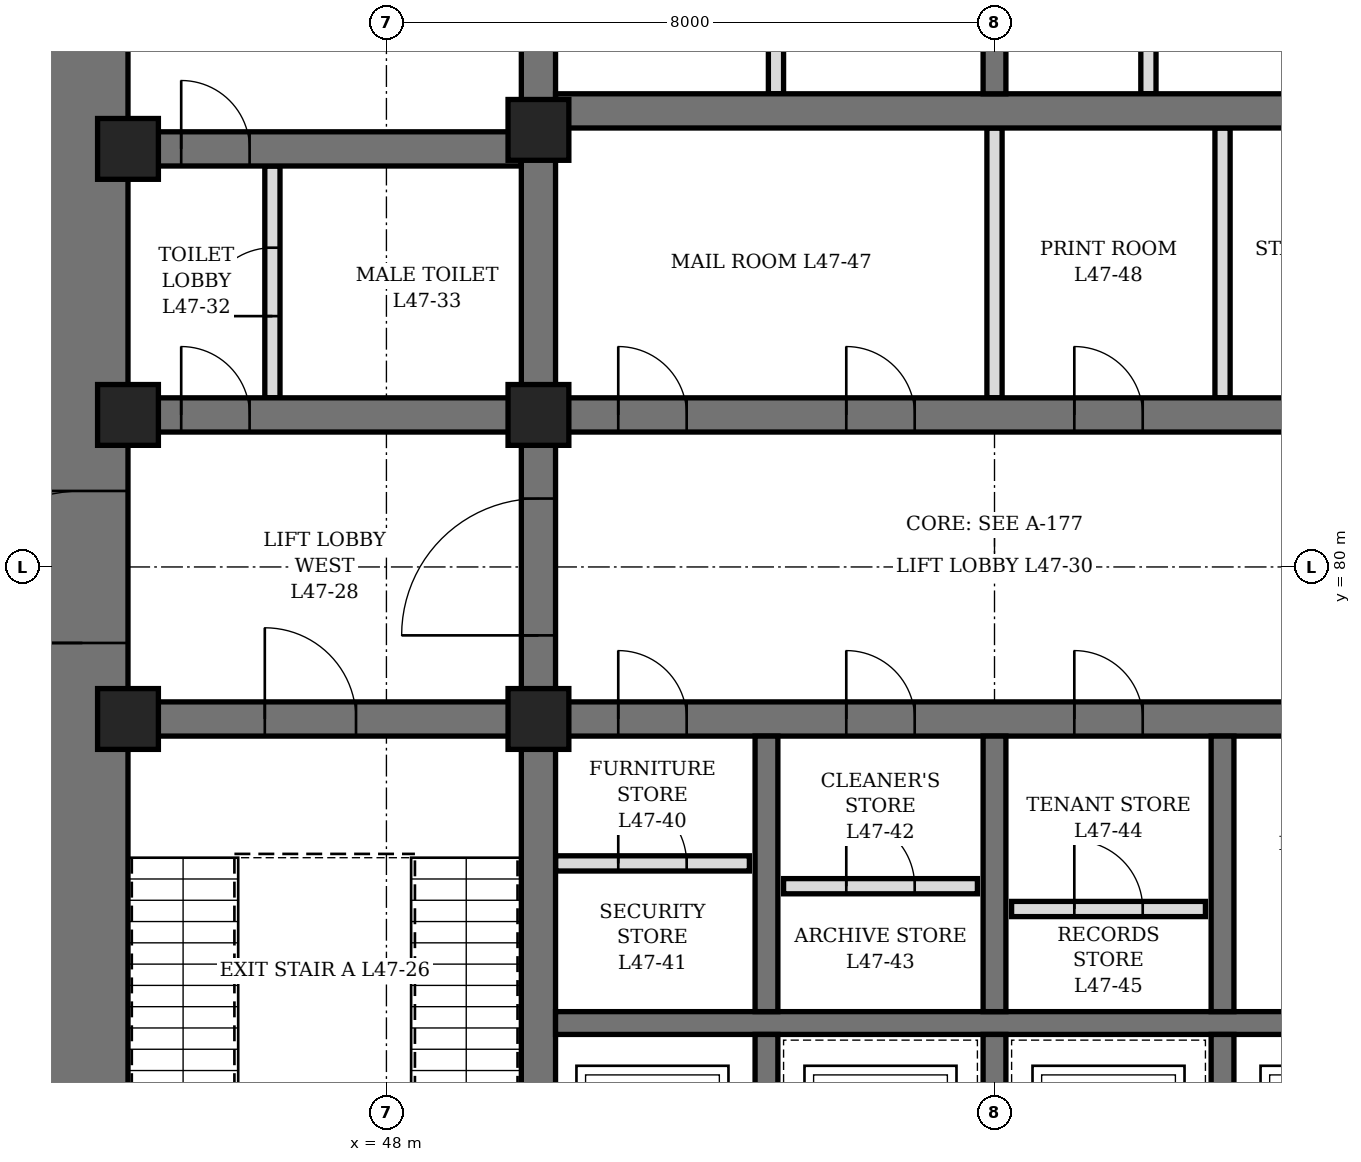
"""IFC4 building model, lengths in metres.
Left out: names, types, materials, properties, quantities, classifications, styles, units other than length and angle.
Written with IfcOpenShell. Run it as: python <this file> out.ifc"""

import sys

from ifc_helpers import new_model, si_unit, direction, frame, frame_2d, origin, origin_2d, place, context, subcontext, project, spatial, rectangle, hollow_rectangle, extrude, element, fill, save


model = new_model("IFC4")
c1 = context("Model", 3, precision=1e-05, world=origin(), true_north=direction((0.0, 1.0)))
c2 = subcontext(c1, "Body", "Model", "MODEL_VIEW")
j1 = project(units=[si_unit("LENGTHUNIT", "METRE"), si_unit("PLANEANGLEUNIT", "RADIAN")], contexts=[c1])
p1 = place(None, origin())
s1 = spatial("IfcSite", under=j1, at=p1, CompositionType="ELEMENT")
p2 = place(p1, origin())
s2 = spatial("IfcBuilding", under=s1, at=p2, CompositionType="ELEMENT")
p3 = place(p2, frame((0.0, 0.0, 210.7)))
s3 = spatial("IfcBuildingStorey", under=s2, at=p3, CompositionType="ELEMENT", Elevation=210.7)
p4 = place(p3, frame((44.0, 70.4, 0.0), z_axis=(0.0, 0.0, 1.0), x_axis=(0.0, 1.0, 0.0)))
e1 = element("IfcWall", 1, at=p4, inside=s3, PredefinedType="SHEAR", context=c2, shape_type="SweptSolid", body=[
    extrude(rectangle(XDim=19.2, YDim=1.2, at=frame_2d((9.6, 0.0))), origin(), (0.0, 0.0, 1.0), 4.2),
])
p5 = place(p4, frame((8.6, 0.0, 0.0)))
e2 = element("IfcOpeningElement", 2, at=p5, cuts=e1, PredefinedType="OPENING", context=c2, shape_type="SweptSolid", body=[
    extrude(rectangle(XDim=2.0, YDim=2.4, at=frame_2d((1.0, 1.2))), frame((0.0, 0.61, 0.0), z_axis=(0.0, -1.0, 0.0), x_axis=(1.0, 0.0, 0.0)), (0.0, 0.0, 1.0), 1.22),
])
p6 = place(p3, frame((50.0, 71.6, 0.0), z_axis=(0.0, 0.0, 1.0), x_axis=(0.0, 1.0, 0.0)))
e3 = element("IfcWall", 3, at=p6, inside=s3, PredefinedType="SHEAR", context=c2, shape_type="SweptSolid", body=[
    extrude(rectangle(XDim=16.8, YDim=0.45, at=frame_2d((8.4, 0.0))), origin(), (0.0, 0.0, 1.0), 4.2),
])
p7 = place(p6, frame((7.5, 0.0, 0.0)))
e4 = element("IfcOpeningElement", 4, at=p7, cuts=e3, PredefinedType="OPENING", context=c2, shape_type="SweptSolid", body=[
    extrude(rectangle(XDim=1.8, YDim=2.4, at=frame_2d((0.9, 1.2))), frame((0.0, 0.235, 0.0), z_axis=(0.0, -1.0, 0.0), x_axis=(1.0, 0.0, 0.0)), (0.0, 0.0, 1.0), 0.47),
])
p8 = place(p3, frame((44.6, 78.0, 0.0), z_axis=(0.0, 0.0, 1.0), x_axis=(1.0, 0.0, 0.0)))
e5 = element("IfcWall", 5, at=p8, inside=s3, PredefinedType="SHEAR", context=c2, shape_type="SweptSolid", body=[
    extrude(rectangle(XDim=5.175, YDim=0.45, at=frame_2d((2.587, 0.0))), origin(), (0.0, 0.0, 1.0), 4.2),
])
p9 = place(p8, frame((1.8, 0.0, 0.0)))
e6 = element("IfcOpeningElement", 6, at=p9, cuts=e5, PredefinedType="OPENING", context=c2, shape_type="SweptSolid", body=[
    extrude(rectangle(XDim=1.2, YDim=2.1, at=frame_2d((0.6, 1.05))), frame((0.0, 0.235, 0.0), z_axis=(0.0, -1.0, 0.0), x_axis=(1.0, 0.0, 0.0)), (0.0, 0.0, 1.0), 0.47),
])
p10 = place(p3, frame((44.6, 82.0, 0.0), z_axis=(0.0, 0.0, 1.0), x_axis=(1.0, 0.0, 0.0)))
e7 = element("IfcWall", 7, at=p10, inside=s3, PredefinedType="SHEAR", context=c2, shape_type="SweptSolid", body=[
    extrude(rectangle(XDim=5.175, YDim=0.45, at=frame_2d((2.587, 0.0))), origin(), (0.0, 0.0, 1.0), 4.2),
])
p11 = place(p10, frame((0.7, 0.0, 0.0)))
e8 = element("IfcOpeningElement", 8, at=p11, cuts=e7, PredefinedType="OPENING", context=c2, shape_type="SweptSolid", body=[
    extrude(rectangle(XDim=0.9, YDim=2.1, at=frame_2d((0.45, 1.05))), frame((0.0, 0.235, 0.0), z_axis=(0.0, -1.0, 0.0), x_axis=(1.0, 0.0, 0.0)), (0.0, 0.0, 1.0), 0.47),
])
p12 = place(p3, frame((44.6, 85.5, 0.0), z_axis=(0.0, 0.0, 1.0), x_axis=(1.0, 0.0, 0.0)))
e9 = element("IfcWall", 9, at=p12, inside=s3, PredefinedType="SHEAR", context=c2, shape_type="SweptSolid", body=[
    extrude(rectangle(XDim=5.175, YDim=0.45, at=frame_2d((2.587, 0.0))), origin(), (0.0, 0.0, 1.0), 4.2),
])
p13 = place(p12, frame((0.7, 0.0, 0.0)))
e10 = element("IfcOpeningElement", 10, at=p13, cuts=e9, PredefinedType="OPENING", context=c2, shape_type="SweptSolid", body=[
    extrude(rectangle(XDim=0.9, YDim=2.1, at=frame_2d((0.45, 1.05))), frame((0.0, 0.235, 0.0), z_axis=(0.0, -1.0, 0.0), x_axis=(1.0, 0.0, 0.0)), (0.0, 0.0, 1.0), 0.47),
])
p14 = place(p3, frame((50.225, 78.0, 0.0), z_axis=(0.0, 0.0, 1.0), x_axis=(1.0, 0.0, 0.0)))
e11 = element("IfcWall", 11, at=p14, inside=s3, PredefinedType="SHEAR", context=c2, shape_type="SweptSolid", body=[
    extrude(rectangle(XDim=11.55, YDim=0.45, at=frame_2d((5.775, 0.0))), origin(), (0.0, 0.0, 1.0), 4.2),
])
p15 = place(p14, frame((0.825, 0.0, 0.0)))
e12 = element("IfcOpeningElement", 12, at=p15, cuts=e11, PredefinedType="OPENING", context=c2, shape_type="SweptSolid", body=[
    extrude(rectangle(XDim=0.9, YDim=2.1, at=frame_2d((0.45, 1.05))), frame((0.0, 0.235, 0.0), z_axis=(0.0, -1.0, 0.0), x_axis=(1.0, 0.0, 0.0)), (0.0, 0.0, 1.0), 0.47),
])
p16 = place(p14, frame((3.825, 0.0, 0.0)))
e13 = element("IfcOpeningElement", 13, at=p16, cuts=e11, PredefinedType="OPENING", context=c2, shape_type="SweptSolid", body=[
    extrude(rectangle(XDim=0.9, YDim=2.1, at=frame_2d((0.45, 1.05))), frame((0.0, 0.235, 0.0), z_axis=(0.0, -1.0, 0.0), x_axis=(1.0, 0.0, 0.0)), (0.0, 0.0, 1.0), 0.47),
])
p17 = place(p14, frame((6.825, 0.0, 0.0)))
e14 = element("IfcOpeningElement", 14, at=p17, cuts=e11, PredefinedType="OPENING", context=c2, shape_type="SweptSolid", body=[
    extrude(rectangle(XDim=0.9, YDim=2.1, at=frame_2d((0.45, 1.05))), frame((0.0, 0.235, 0.0), z_axis=(0.0, -1.0, 0.0), x_axis=(1.0, 0.0, 0.0)), (0.0, 0.0, 1.0), 0.47),
])
p18 = place(p14, frame((9.825, 0.0, 0.0)))
e15 = element("IfcOpeningElement", 15, at=p18, cuts=e11, PredefinedType="OPENING", context=c2, shape_type="SweptSolid", body=[
    extrude(rectangle(XDim=0.9, YDim=2.1, at=frame_2d((0.45, 1.05))), frame((0.0, 0.235, 0.0), z_axis=(0.0, -1.0, 0.0), x_axis=(1.0, 0.0, 0.0)), (0.0, 0.0, 1.0), 0.47),
])
p19 = place(p3, frame((50.225, 82.0, 0.0), z_axis=(0.0, 0.0, 1.0), x_axis=(1.0, 0.0, 0.0)))
e16 = element("IfcWall", 16, at=p19, inside=s3, PredefinedType="SHEAR", context=c2, shape_type="SweptSolid", body=[
    extrude(rectangle(XDim=11.55, YDim=0.45, at=frame_2d((5.775, 0.0))), origin(), (0.0, 0.0, 1.0), 4.2),
])
p20 = place(p19, frame((0.825, 0.0, 0.0)))
e17 = element("IfcOpeningElement", 17, at=p20, cuts=e16, PredefinedType="OPENING", context=c2, shape_type="SweptSolid", body=[
    extrude(rectangle(XDim=0.9, YDim=2.1, at=frame_2d((0.45, 1.05))), frame((0.0, 0.235, 0.0), z_axis=(0.0, -1.0, 0.0), x_axis=(1.0, 0.0, 0.0)), (0.0, 0.0, 1.0), 0.47),
])
p21 = place(p19, frame((3.825, 0.0, 0.0)))
e18 = element("IfcOpeningElement", 18, at=p21, cuts=e16, PredefinedType="OPENING", context=c2, shape_type="SweptSolid", body=[
    extrude(rectangle(XDim=0.9, YDim=2.1, at=frame_2d((0.45, 1.05))), frame((0.0, 0.235, 0.0), z_axis=(0.0, -1.0, 0.0), x_axis=(1.0, 0.0, 0.0)), (0.0, 0.0, 1.0), 0.47),
])
p22 = place(p19, frame((6.825, 0.0, 0.0)))
e19 = element("IfcOpeningElement", 19, at=p22, cuts=e16, PredefinedType="OPENING", context=c2, shape_type="SweptSolid", body=[
    extrude(rectangle(XDim=0.9, YDim=2.1, at=frame_2d((0.45, 1.05))), frame((0.0, 0.235, 0.0), z_axis=(0.0, -1.0, 0.0), x_axis=(1.0, 0.0, 0.0)), (0.0, 0.0, 1.0), 0.47),
])
p23 = place(p19, frame((9.825, 0.0, 0.0)))
e20 = element("IfcOpeningElement", 20, at=p23, cuts=e16, PredefinedType="OPENING", context=c2, shape_type="SweptSolid", body=[
    extrude(rectangle(XDim=0.9, YDim=2.1, at=frame_2d((0.45, 1.05))), frame((0.0, 0.235, 0.0), z_axis=(0.0, -1.0, 0.0), x_axis=(1.0, 0.0, 0.0)), (0.0, 0.0, 1.0), 0.47),
])
p24 = place(p3, frame((50.225, 86.0, 0.0), z_axis=(0.0, 0.0, 1.0), x_axis=(1.0, 0.0, 0.0)))
e21 = element("IfcWall", 21, at=p24, inside=s3, PredefinedType="SHEAR", context=c2, shape_type="SweptSolid", body=[
    extrude(rectangle(XDim=11.55, YDim=0.45, at=frame_2d((5.775, 0.0))), origin(), (0.0, 0.0, 1.0), 4.2),
])
p25 = place(p3, frame((50.225, 74.0, 0.0), z_axis=(0.0, 0.0, 1.0), x_axis=(1.0, 0.0, 0.0)))
e22 = element("IfcWall", 22, at=p25, inside=s3, PredefinedType="SHEAR", context=c2, shape_type="SweptSolid", body=[
    extrude(rectangle(XDim=11.55, YDim=0.3, at=frame_2d((5.775, 0.0))), origin(), (0.0, 0.0, 1.0), 4.2),
])
p26 = place(p3, frame((53.0, 71.6, 0.0), z_axis=(0.0, 0.0, 1.0), x_axis=(0.0, 1.0, 0.0)))
e23 = element("IfcWall", 23, at=p26, inside=s3, PredefinedType="SHEAR", context=c2, shape_type="SweptSolid", body=[
    extrude(rectangle(XDim=2.25, YDim=0.3, at=frame_2d((1.125, 0.0))), origin(), (0.0, 0.0, 1.0), 4.2),
])
p27 = place(p3, frame((53.0, 74.15, 0.0), z_axis=(0.0, 0.0, 1.0), x_axis=(0.0, 1.0, 0.0)))
e24 = element("IfcWall", 24, at=p27, inside=s3, PredefinedType="SHEAR", context=c2, shape_type="SweptSolid", body=[
    extrude(rectangle(XDim=3.625, YDim=0.3, at=frame_2d((1.812, 0.0))), origin(), (0.0, 0.0, 1.0), 4.2),
])
p28 = place(p3, frame((56.0, 71.6, 0.0), z_axis=(0.0, 0.0, 1.0), x_axis=(0.0, 1.0, 0.0)))
e25 = element("IfcWall", 25, at=p28, inside=s3, PredefinedType="SHEAR", context=c2, shape_type="SweptSolid", body=[
    extrude(rectangle(XDim=2.25, YDim=0.3, at=frame_2d((1.125, 0.0))), origin(), (0.0, 0.0, 1.0), 4.2),
])
p29 = place(p3, frame((56.0, 74.15, 0.0), z_axis=(0.0, 0.0, 1.0), x_axis=(0.0, 1.0, 0.0)))
e26 = element("IfcWall", 26, at=p29, inside=s3, PredefinedType="SHEAR", context=c2, shape_type="SweptSolid", body=[
    extrude(rectangle(XDim=3.625, YDim=0.3, at=frame_2d((1.812, 0.0))), origin(), (0.0, 0.0, 1.0), 4.2),
])
p30 = place(p3, frame((59.0, 71.6, 0.0), z_axis=(0.0, 0.0, 1.0), x_axis=(0.0, 1.0, 0.0)))
e27 = element("IfcWall", 27, at=p30, inside=s3, PredefinedType="SHEAR", context=c2, shape_type="SweptSolid", body=[
    extrude(rectangle(XDim=2.25, YDim=0.3, at=frame_2d((1.125, 0.0))), origin(), (0.0, 0.0, 1.0), 4.2),
])
p31 = place(p3, frame((59.0, 74.15, 0.0), z_axis=(0.0, 0.0, 1.0), x_axis=(0.0, 1.0, 0.0)))
e28 = element("IfcWall", 28, at=p31, inside=s3, PredefinedType="SHEAR", context=c2, shape_type="SweptSolid", body=[
    extrude(rectangle(XDim=3.625, YDim=0.3, at=frame_2d((1.812, 0.0))), origin(), (0.0, 0.0, 1.0), 4.2),
])
p32 = place(p3, frame((56.0, 86.225, 0.0), z_axis=(0.0, 0.0, 1.0), x_axis=(0.0, 1.0, 0.0)))
e29 = element("IfcWall", 29, at=p32, inside=s3, PredefinedType="SHEAR", context=c2, shape_type="SweptSolid", body=[
    extrude(rectangle(XDim=2.175, YDim=0.3, at=frame_2d((1.087, 0.0))), origin(), (0.0, 0.0, 1.0), 4.2),
])
for number, where, z_axis, x_axis in (
    (30, (44.6, 78.0, 0.0), (0.0, 0.0, 1.0), (1.0, 0.0, 0.0)),
    (31, (44.6, 82.0, 0.0), (0.0, 0.0, 1.0), (1.0, 0.0, 0.0)),
    (32, (44.6, 85.5, 0.0), (0.0, 0.0, 1.0), (1.0, 0.0, 0.0)),
    (33, (50.0, 78.0, 0.0), (0.0, 0.0, 1.0), (1.0, 0.0, 0.0)),
    (34, (50.0, 82.0, 0.0), (0.0, 0.0, 1.0), (1.0, 0.0, 0.0)),
    (35, (50.0, 85.75, 0.0), (0.0, 0.0, 1.0), (1.0, 0.0, 0.0)),
):
    element("IfcColumn", number, at=place(p3, frame(where, z_axis=z_axis, x_axis=x_axis)), inside=s3, PredefinedType="COLUMN", context=c2, shape_type="SweptSolid", body=[
        extrude(hollow_rectangle(XDim=0.8, YDim=0.8, WallThickness=0.1, at=origin_2d()), origin(), (0.0, 0.0, 1.0), 4.2),
    ])
p33 = place(p3, frame((46.5, 82.225, 0.0), z_axis=(0.0, 0.0, 1.0), x_axis=(0.0, 1.0, 0.0)))
e36 = element("IfcWall", 36, at=p33, inside=s3, PredefinedType="PARTITIONING", context=c2, shape_type="SweptSolid", body=[
    extrude(rectangle(XDim=3.05, YDim=0.2, at=frame_2d((1.525, 0.0))), origin(), (0.0, 0.0, 1.0), 4.04),
])
p34 = place(p33, frame((1.075, 0.0, 0.0)))
e37 = element("IfcOpeningElement", 37, at=p34, cuts=e36, PredefinedType="OPENING", context=c2, shape_type="SweptSolid", body=[
    extrude(rectangle(XDim=0.9, YDim=2.1, at=frame_2d((0.45, 1.05))), frame((0.0, 0.11, 0.0), z_axis=(0.0, -1.0, 0.0), x_axis=(1.0, 0.0, 0.0)), (0.0, 0.0, 1.0), 0.22),
])
for number, where, z_axis, x_axis in (
    (38, (53.125, 86.225, 0.0), (0.0, 0.0, 1.0), (0.0, 1.0, 0.0)),
    (39, (58.025, 86.225, 0.0), (0.0, 0.0, 1.0), (0.0, 1.0, 0.0)),
):
    element("IfcWall", number, at=place(p3, frame(where, z_axis=z_axis, x_axis=x_axis)), inside=s3, PredefinedType="PARTITIONING", context=c2, shape_type="SweptSolid", body=[
        extrude(rectangle(XDim=2.175, YDim=0.2, at=frame_2d((1.087, 0.0))), origin(), (0.0, 0.0, 1.0), 4.04),
    ])
p35 = place(p3, frame((50.225, 76.1, 0.0), z_axis=(0.0, 0.0, 1.0), x_axis=(1.0, 0.0, 0.0)))
e40 = element("IfcWall", 40, at=p35, inside=s3, PredefinedType="PARTITIONING", context=c2, shape_type="SweptSolid", body=[
    extrude(rectangle(XDim=2.55, YDim=0.2, at=frame_2d((1.275, 0.0))), origin(), (0.0, 0.0, 1.0), 4.04),
])
p36 = place(p35, frame((0.825, 0.0, 0.0)))
e41 = element("IfcOpeningElement", 41, at=p36, cuts=e40, PredefinedType="OPENING", context=c2, shape_type="SweptSolid", body=[
    extrude(rectangle(XDim=0.9, YDim=2.1, at=frame_2d((0.45, 1.05))), frame((0.0, 0.11, 0.0), z_axis=(0.0, -1.0, 0.0), x_axis=(1.0, 0.0, 0.0)), (0.0, 0.0, 1.0), 0.22),
])
p37 = place(p3, frame((53.225, 75.8, 0.0), z_axis=(0.0, 0.0, 1.0), x_axis=(1.0, 0.0, 0.0)))
e42 = element("IfcWall", 42, at=p37, inside=s3, PredefinedType="PARTITIONING", context=c2, shape_type="SweptSolid", body=[
    extrude(rectangle(XDim=2.55, YDim=0.2, at=frame_2d((1.275, 0.0))), origin(), (0.0, 0.0, 1.0), 4.04),
])
p38 = place(p37, frame((0.825, 0.0, 0.0)))
e43 = element("IfcOpeningElement", 43, at=p38, cuts=e42, PredefinedType="OPENING", context=c2, shape_type="SweptSolid", body=[
    extrude(rectangle(XDim=0.9, YDim=2.1, at=frame_2d((0.45, 1.05))), frame((0.0, 0.11, 0.0), z_axis=(0.0, -1.0, 0.0), x_axis=(1.0, 0.0, 0.0)), (0.0, 0.0, 1.0), 0.22),
])
p39 = place(p3, frame((56.225, 75.5, 0.0), z_axis=(0.0, 0.0, 1.0), x_axis=(1.0, 0.0, 0.0)))
e44 = element("IfcWall", 44, at=p39, inside=s3, PredefinedType="PARTITIONING", context=c2, shape_type="SweptSolid", body=[
    extrude(rectangle(XDim=2.55, YDim=0.2, at=frame_2d((1.275, 0.0))), origin(), (0.0, 0.0, 1.0), 4.04),
])
p40 = place(p39, frame((0.825, 0.0, 0.0)))
e45 = element("IfcOpeningElement", 45, at=p40, cuts=e44, PredefinedType="OPENING", context=c2, shape_type="SweptSolid", body=[
    extrude(rectangle(XDim=0.9, YDim=2.1, at=frame_2d((0.45, 1.05))), frame((0.0, 0.11, 0.0), z_axis=(0.0, -1.0, 0.0), x_axis=(1.0, 0.0, 0.0)), (0.0, 0.0, 1.0), 0.22),
])
p41 = place(p3, frame((56.0, 82.225, 0.0), z_axis=(0.0, 0.0, 1.0), x_axis=(0.0, 1.0, 0.0)))
e46 = element("IfcWall", 46, at=p41, inside=s3, PredefinedType="PARTITIONING", context=c2, shape_type="SweptSolid", body=[
    extrude(rectangle(XDim=3.55, YDim=0.2, at=frame_2d((1.775, 0.0))), origin(), (0.0, 0.0, 1.0), 3.14),
])
p42 = place(p3, frame((59.0, 82.225, 0.0), z_axis=(0.0, 0.0, 1.0), x_axis=(0.0, 1.0, 0.0)))
e47 = element("IfcWall", 47, at=p42, inside=s3, PredefinedType="PARTITIONING", context=c2, shape_type="SweptSolid", body=[
    extrude(rectangle(XDim=3.55, YDim=0.2, at=frame_2d((1.775, 0.0))), origin(), (0.0, 0.0, 1.0), 4.04),
])
p43 = place(p11, origin())
e48 = element("IfcDoor", 48, at=p43, inside=s3, OperationType="SINGLE_SWING_LEFT", PredefinedType="DOOR", context=c2, shape_type="SweptSolid", body=[
    extrude(rectangle(XDim=0.9, YDim=2.1, at=frame_2d((0.45, 1.05))), frame((0.0, 0.225, 0.0), z_axis=(0.0, -1.0, 0.0), x_axis=(1.0, 0.0, 0.0)), (0.0, 0.0, 1.0), 0.449),
])
fill(e8, e48)
p44 = place(p34, origin())
e49 = element("IfcDoor", 49, at=p44, inside=s3, OperationType="SINGLE_SWING_RIGHT", PredefinedType="DOOR", context=c2, shape_type="SweptSolid", body=[
    extrude(rectangle(XDim=0.9, YDim=2.1, at=frame_2d((0.45, 1.05))), frame((0.0, 0.1, 0.0), z_axis=(0.0, -1.0, 0.0), x_axis=(1.0, 0.0, 0.0)), (0.0, 0.0, 1.0), 0.199),
])
fill(e37, e49)
p45 = place(p13, origin())
e50 = element("IfcDoor", 50, at=p45, inside=s3, OperationType="SINGLE_SWING_RIGHT", PredefinedType="DOOR", context=c2, shape_type="SweptSolid", body=[
    extrude(rectangle(XDim=0.9, YDim=2.1, at=frame_2d((0.45, 1.05))), frame((0.0, 0.225, 0.0), z_axis=(0.0, -1.0, 0.0), x_axis=(1.0, 0.0, 0.0)), (0.0, 0.0, 1.0), 0.449),
])
fill(e10, e50)
p46 = place(p15, origin())
e51 = element("IfcDoor", 51, at=p46, inside=s3, OperationType="SINGLE_SWING_LEFT", PredefinedType="DOOR", context=c2, shape_type="SweptSolid", body=[
    extrude(rectangle(XDim=0.9, YDim=2.1, at=frame_2d((0.45, 1.05))), frame((0.0, 0.225, 0.0), z_axis=(0.0, -1.0, 0.0), x_axis=(1.0, 0.0, 0.0)), (0.0, 0.0, 1.0), 0.449),
])
fill(e12, e51)
p47 = place(p36, origin())
e52 = element("IfcDoor", 52, at=p47, inside=s3, OperationType="SINGLE_SWING_LEFT", PredefinedType="DOOR", context=c2, shape_type="SweptSolid", body=[
    extrude(rectangle(XDim=0.9, YDim=2.1, at=frame_2d((0.45, 1.05))), frame((0.0, 0.1, 0.0), z_axis=(0.0, -1.0, 0.0), x_axis=(1.0, 0.0, 0.0)), (0.0, 0.0, 1.0), 0.199),
])
fill(e41, e52)
p48 = place(p16, origin())
e53 = element("IfcDoor", 53, at=p48, inside=s3, OperationType="SINGLE_SWING_LEFT", PredefinedType="DOOR", context=c2, shape_type="SweptSolid", body=[
    extrude(rectangle(XDim=0.9, YDim=2.1, at=frame_2d((0.45, 1.05))), frame((0.0, 0.225, 0.0), z_axis=(0.0, -1.0, 0.0), x_axis=(1.0, 0.0, 0.0)), (0.0, 0.0, 1.0), 0.449),
])
fill(e13, e53)
p49 = place(p38, origin())
e54 = element("IfcDoor", 54, at=p49, inside=s3, OperationType="SINGLE_SWING_LEFT", PredefinedType="DOOR", context=c2, shape_type="SweptSolid", body=[
    extrude(rectangle(XDim=0.9, YDim=2.1, at=frame_2d((0.45, 1.05))), frame((0.0, 0.1, 0.0), z_axis=(0.0, -1.0, 0.0), x_axis=(1.0, 0.0, 0.0)), (0.0, 0.0, 1.0), 0.199),
])
fill(e43, e54)
p50 = place(p17, origin())
e55 = element("IfcDoor", 55, at=p50, inside=s3, OperationType="SINGLE_SWING_LEFT", PredefinedType="DOOR", context=c2, shape_type="SweptSolid", body=[
    extrude(rectangle(XDim=0.9, YDim=2.1, at=frame_2d((0.45, 1.05))), frame((0.0, 0.225, 0.0), z_axis=(0.0, -1.0, 0.0), x_axis=(1.0, 0.0, 0.0)), (0.0, 0.0, 1.0), 0.449),
])
fill(e14, e55)
p51 = place(p40, origin())
e56 = element("IfcDoor", 56, at=p51, inside=s3, OperationType="SINGLE_SWING_LEFT", PredefinedType="DOOR", context=c2, shape_type="SweptSolid", body=[
    extrude(rectangle(XDim=0.9, YDim=2.1, at=frame_2d((0.45, 1.05))), frame((0.0, 0.1, 0.0), z_axis=(0.0, -1.0, 0.0), x_axis=(1.0, 0.0, 0.0)), (0.0, 0.0, 1.0), 0.199),
])
fill(e45, e56)
p52 = place(p20, origin())
e57 = element("IfcDoor", 57, at=p52, inside=s3, OperationType="SINGLE_SWING_LEFT", PredefinedType="DOOR", context=c2, shape_type="SweptSolid", body=[
    extrude(rectangle(XDim=0.9, YDim=2.1, at=frame_2d((0.45, 1.05))), frame((0.0, 0.225, 0.0), z_axis=(0.0, -1.0, 0.0), x_axis=(1.0, 0.0, 0.0)), (0.0, 0.0, 1.0), 0.449),
])
fill(e17, e57)
p53 = place(p21, origin())
e58 = element("IfcDoor", 58, at=p53, inside=s3, OperationType="SINGLE_SWING_LEFT", PredefinedType="DOOR", context=c2, shape_type="SweptSolid", body=[
    extrude(rectangle(XDim=0.9, YDim=2.1, at=frame_2d((0.45, 1.05))), frame((0.0, 0.225, 0.0), z_axis=(0.0, -1.0, 0.0), x_axis=(1.0, 0.0, 0.0)), (0.0, 0.0, 1.0), 0.449),
])
fill(e18, e58)
p54 = place(p22, origin())
e59 = element("IfcDoor", 59, at=p54, inside=s3, OperationType="SINGLE_SWING_LEFT", PredefinedType="DOOR", context=c2, shape_type="SweptSolid", body=[
    extrude(rectangle(XDim=0.9, YDim=2.1, at=frame_2d((0.45, 1.05))), frame((0.0, 0.225, 0.0), z_axis=(0.0, -1.0, 0.0), x_axis=(1.0, 0.0, 0.0)), (0.0, 0.0, 1.0), 0.449),
])
fill(e19, e59)
p55 = place(p9, origin())
e60 = element("IfcDoor", 60, at=p55, inside=s3, OperationType="SINGLE_SWING_LEFT", PredefinedType="DOOR", context=c2, shape_type="SweptSolid", body=[
    extrude(rectangle(XDim=1.2, YDim=2.1, at=frame_2d((0.6, 1.05))), frame((0.0, 0.225, 0.0), z_axis=(0.0, -1.0, 0.0), x_axis=(1.0, 0.0, 0.0)), (0.0, 0.0, 1.0), 0.449),
])
fill(e6, e60)
p56 = place(p5, origin())
e61 = element("IfcDoor", 61, at=p56, inside=s3, OperationType="DOUBLE_DOOR_SINGLE_SWING", PredefinedType="DOOR", context=c2, shape_type="SweptSolid", body=[
    extrude(rectangle(XDim=2.0, YDim=2.4, at=frame_2d((1.0, 1.2))), frame((0.0, 0.35, 0.0), z_axis=(0.0, -1.0, 0.0), x_axis=(1.0, 0.0, 0.0)), (0.0, 0.0, 1.0), 0.7),
])
fill(e2, e61)
p57 = place(p7, origin())
e62 = element("IfcDoor", 62, at=p57, inside=s3, OperationType="DOUBLE_DOOR_SINGLE_SWING", PredefinedType="DOOR", context=c2, shape_type="SweptSolid", body=[
    extrude(rectangle(XDim=1.8, YDim=2.4, at=frame_2d((0.9, 1.2))), frame((0.0, 0.225, 0.0), z_axis=(0.0, -1.0, 0.0), x_axis=(1.0, 0.0, 0.0)), (0.0, 0.0, 1.0), 0.449),
])
fill(e4, e62)
save(model, sys.argv[1])
